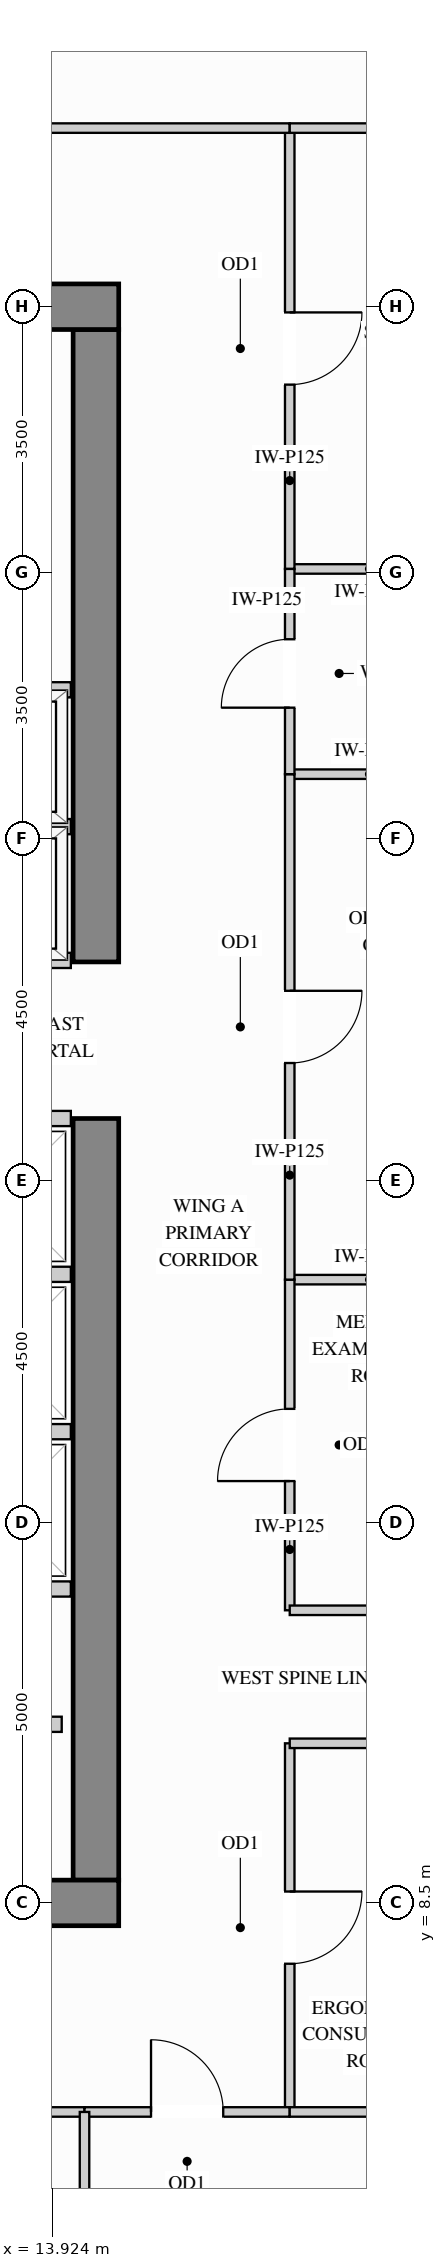
"""IFC4 building model, lengths in metres.
Left out: names, types, materials, properties, quantities, classifications, styles, units other than length and angle.
Written with IfcOpenShell. Run it as: python <this file> out.ifc"""

import sys

from ifc_helpers import new_model, si_unit, direction, frame, frame_2d, origin, place, context, subcontext, project, spatial, rectangle, extrude, source, transform, mapped, element, fill, save


model = new_model("IFC4")
c1 = context("Model", 3, precision=1e-05, world=origin(), true_north=direction((0.0, 1.0)))
c2 = subcontext(c1, "Body", "Model", "MODEL_VIEW")
j1 = project(units=[si_unit("LENGTHUNIT", "METRE"), si_unit("PLANEANGLEUNIT", "RADIAN")], contexts=[c1])
p1 = place(None, origin())
s1 = spatial("IfcSite", under=j1, at=p1, CompositionType="ELEMENT")
p2 = place(p1, origin())
s2 = spatial("IfcBuilding", under=s1, at=p2, CompositionType="ELEMENT")
p3 = place(p2, frame((0.0, 0.0, 182.7)))
s3 = spatial("IfcBuildingStorey", under=s2, at=p3, CompositionType="ELEMENT", Elevation=182.7)
m1 = source(origin(), c2, "Body", "SweptSolid", [
    extrude(rectangle(XDim=10.02, YDim=0.6, at=frame_2d((5.01, 0.0))), origin(), (0.0, 0.0, 1.0), 3.4),
])
p4 = place(p3, frame((14.5, 8.8, 0.0), z_axis=(0.0, 0.0, 1.0), x_axis=(0.0, 1.0, 0.0)))
e1 = element("IfcWall", 1, at=p4, inside=s3, PredefinedType="SHEAR", context=c2, shape_type="MappedRepresentation", body=[
    mapped(m1, transform((0.0, 0.0, 0.0), x_axis=(1.0, 0.0, 0.0), y_axis=(0.0, 1.0, 0.0), z_axis=(0.0, 0.0, 1.0))),
])
m2 = source(origin(), c2, "Body", "SweptSolid", [
    extrude(rectangle(XDim=8.32, YDim=0.6, at=frame_2d((4.16, 0.0))), origin(), (0.0, 0.0, 1.0), 3.4),
])
p5 = place(p3, frame((14.5, 20.88, 0.0), z_axis=(0.0, 0.0, 1.0), x_axis=(0.0, 1.0, 0.0)))
e2 = element("IfcWall", 2, at=p5, inside=s3, PredefinedType="SHEAR", context=c2, shape_type="MappedRepresentation", body=[
    mapped(m2, transform((0.0, 0.0, 0.0), x_axis=(1.0, 0.0, 0.0), y_axis=(0.0, 1.0, 0.0), z_axis=(0.0, 0.0, 1.0))),
])
m3 = source(origin(), c2, "Body", "SweptSolid", [
    extrude(rectangle(XDim=10.6, YDim=0.6, at=frame_2d((5.3, 0.0))), origin(), (0.0, 0.0, 1.0), 3.4),
])
for number, where, z_axis, x_axis in (
    (3, (4.2, 29.5, 0.0), (0.0, 0.0, 1.0), (1.0, 0.0, 0.0)),
    (4, (4.2, 8.5, 0.0), (0.0, 0.0, 1.0), (1.0, 0.0, 0.0)),
):
    element("IfcWall", number, at=place(p3, frame(where, z_axis=z_axis, x_axis=x_axis)), inside=s3, PredefinedType="SHEAR", context=c2, shape_type="MappedRepresentation", body=[
        mapped(m3, transform((0.0, 0.0, 0.0), x_axis=(1.0, 0.0, 0.0), y_axis=(0.0, 1.0, 0.0), z_axis=(0.0, 0.0, 1.0))),
    ])
m4 = source(origin(), c2, "Body", "SweptSolid", [
    extrude(rectangle(XDim=2.1, YDim=0.125, at=frame_2d((1.05, 0.0))), origin(), (0.0, 0.0, 1.0), 2.916),
])
p6 = place(p3, frame((17.05, 16.7, 0.0), z_axis=(0.0, 0.0, 1.0), x_axis=(1.0, 0.0, 0.0)))
e5 = element("IfcWall", 5, at=p6, inside=s3, PredefinedType="PARTITIONING", context=c2, shape_type="MappedRepresentation", body=[
    mapped(m4, transform((0.0, 0.0, 0.0), x_axis=(1.0, 0.0, 0.0), y_axis=(0.0, 1.0, 0.0), z_axis=(0.0, 0.0, 1.0))),
])
m5 = source(origin(), c2, "Body", "SweptSolid", [
    extrude(rectangle(XDim=2.098, YDim=0.125, at=frame_2d((1.049, 0.0))), origin(), (0.0, 0.0, 1.0), 3.385),
])
for number, where, z_axis, x_axis in (
    (6, (17.05, 23.35, 0.0), (0.0, 0.0, 1.0), (1.0, 0.0, 0.0)),
    (7, (17.05, 26.05, 0.0), (0.0, 0.0, 1.0), (1.0, 0.0, 0.0)),
):
    element("IfcWall", number, at=place(p3, frame(where, z_axis=z_axis, x_axis=x_axis)), inside=s3, PredefinedType="PARTITIONING", context=c2, shape_type="MappedRepresentation", body=[
        mapped(m5, transform((0.0, 0.0, 0.0), x_axis=(1.0, 0.0, 0.0), y_axis=(0.0, 1.0, 0.0), z_axis=(0.0, 0.0, 1.0))),
    ])
p7 = place(p3, frame((17.05, 12.35, 0.0), z_axis=(0.0, 0.0, 1.0), x_axis=(0.0, 1.0, 0.0)))
e8 = element("IfcWall", 8, at=p7, inside=s3, PredefinedType="PARTITIONING", context=c2, shape_type="SweptSolid", body=[
    extrude(rectangle(XDim=4.35, YDim=0.125, at=frame_2d((2.175, 0.0))), origin(), (0.0, 0.0, 1.0), 3.385),
])
p8 = place(p7, frame((1.7, 0.0, 0.0)))
e9 = element("IfcOpeningElement", 9, at=p8, cuts=e8, PredefinedType="OPENING", context=c2, shape_type="SweptSolid", body=[
    extrude(rectangle(XDim=0.95, YDim=2.15, at=frame_2d((0.475, 1.075))), frame((0.0, 0.073, 0.0), z_axis=(0.0, -1.0, 0.0), x_axis=(1.0, 0.0, 0.0)), (0.0, 0.0, 1.0), 0.145),
])
p9 = place(p3, frame((17.05, 16.7, 0.0), z_axis=(0.0, 0.0, 1.0), x_axis=(0.0, 1.0, 0.0)))
e10 = element("IfcWall", 10, at=p9, inside=s3, PredefinedType="PARTITIONING", context=c2, shape_type="SweptSolid", body=[
    extrude(rectangle(XDim=6.65, YDim=0.125, at=frame_2d((3.325, 0.0))), origin(), (0.0, 0.0, 1.0), 3.385),
])
p10 = place(p9, frame((2.85, 0.0, 0.0)))
e11 = element("IfcOpeningElement", 11, at=p10, cuts=e10, PredefinedType="OPENING", context=c2, shape_type="SweptSolid", body=[
    extrude(rectangle(XDim=0.95, YDim=2.15, at=frame_2d((0.475, 1.075))), frame((0.0, 0.073, 0.0), z_axis=(0.0, -1.0, 0.0), x_axis=(1.0, 0.0, 0.0)), (0.0, 0.0, 1.0), 0.145),
])
p11 = place(p3, frame((17.05, 26.05, 0.0), z_axis=(0.0, 0.0, 1.0), x_axis=(0.0, 1.0, 0.0)))
e12 = element("IfcWall", 12, at=p11, inside=s3, PredefinedType="PARTITIONING", context=c2, shape_type="SweptSolid", body=[
    extrude(rectangle(XDim=5.8, YDim=0.125, at=frame_2d((2.9, 0.0))), origin(), (0.0, 0.0, 1.0), 3.385),
])
p12 = place(p11, frame((2.425, 0.0, 0.0)))
e13 = element("IfcOpeningElement", 13, at=p12, cuts=e12, PredefinedType="OPENING", context=c2, shape_type="SweptSolid", body=[
    extrude(rectangle(XDim=0.95, YDim=2.15, at=frame_2d((0.475, 1.075))), frame((0.0, 0.073, 0.0), z_axis=(0.0, -1.0, 0.0), x_axis=(1.0, 0.0, 0.0)), (0.0, 0.0, 1.0), 0.145),
])
p13 = place(p3, frame((17.05, 5.75, 0.0), z_axis=(0.0, 0.0, 1.0), x_axis=(0.0, 1.0, 0.0)))
e14 = element("IfcWall", 14, at=p13, inside=s3, PredefinedType="PARTITIONING", context=c2, shape_type="SweptSolid", body=[
    extrude(rectangle(XDim=4.85, YDim=0.125, at=frame_2d((2.425, 0.0))), origin(), (0.0, 0.0, 1.0), 3.385),
])
p14 = place(p13, frame((1.95, 0.0, 0.0)))
e15 = element("IfcOpeningElement", 15, at=p14, cuts=e14, PredefinedType="OPENING", context=c2, shape_type="SweptSolid", body=[
    extrude(rectangle(XDim=0.95, YDim=2.15, at=frame_2d((0.475, 1.075))), frame((0.0, 0.073, 0.0), z_axis=(0.0, -1.0, 0.0), x_axis=(1.0, 0.0, 0.0)), (0.0, 0.0, 1.0), 0.145),
])
p15 = place(p3, frame((17.05, 23.35, 0.0), z_axis=(0.0, 0.0, 1.0), x_axis=(0.0, 1.0, 0.0)))
e16 = element("IfcWall", 16, at=p15, inside=s3, PredefinedType="PARTITIONING", context=c2, shape_type="SweptSolid", body=[
    extrude(rectangle(XDim=2.7, YDim=0.125, at=frame_2d((1.35, 0.0))), origin(), (0.0, 0.0, 1.0), 3.385),
])
p16 = place(p15, frame((0.875, 0.0, 0.0)))
e17 = element("IfcOpeningElement", 17, at=p16, cuts=e16, PredefinedType="OPENING", context=c2, shape_type="SweptSolid", body=[
    extrude(rectangle(XDim=0.9, YDim=2.15, at=frame_2d((0.45, 1.075))), frame((0.0, 0.073, 0.0), z_axis=(0.0, -1.0, 0.0), x_axis=(1.0, 0.0, 0.0)), (0.0, 0.0, 1.0), 0.145),
])
p17 = place(p3, frame((9.039, 31.85, 0.0), z_axis=(0.0, 0.0, 1.0), x_axis=(1.0, 0.0, 0.0)))
e18 = element("IfcWall", 18, at=p17, inside=s3, PredefinedType="PARTITIONING", context=c2, shape_type="SweptSolid", body=[
    extrude(rectangle(XDim=8.011, YDim=0.125, at=frame_2d((4.005, 0.0))), origin(), (0.0, 0.0, 1.0), 2.848),
])
p18 = place(p17, frame((3.531, 0.0, 0.0)))
e19 = element("IfcOpeningElement", 19, at=p18, cuts=e18, PredefinedType="OPENING", context=c2, shape_type="SweptSolid", body=[
    extrude(rectangle(XDim=0.95, YDim=2.15, at=frame_2d((0.475, 1.075))), frame((0.0, 0.073, 0.0), z_axis=(0.0, -1.0, 0.0), x_axis=(1.0, 0.0, 0.0)), (0.0, 0.0, 1.0), 0.145),
])
m6 = source(origin(), c2, "Body", "SweptSolid", [
    extrude(rectangle(XDim=2.098, YDim=0.125, at=frame_2d((1.049, 0.0))), origin(), (0.0, 0.0, 1.0), 2.848),
])
p19 = place(p3, frame((17.05, 31.85, 0.0), z_axis=(0.0, 0.0, 1.0), x_axis=(1.0, 0.0, 0.0)))
e20 = element("IfcWall", 20, at=p19, inside=s3, PredefinedType="PARTITIONING", context=c2, shape_type="MappedRepresentation", body=[
    mapped(m6, transform((0.0, 0.0, 0.0), x_axis=(1.0, 0.0, 0.0), y_axis=(0.0, 1.0, 0.0), z_axis=(0.0, 0.0, 1.0))),
])
m7 = source(origin(), c2, "Body", "SweptSolid", [
    extrude(rectangle(XDim=2.45, YDim=0.125, at=frame_2d((1.225, 0.0))), origin(), (0.0, 0.0, 1.0), 3.385),
])
for number, where, z_axis, x_axis in (
    (21, (17.05, 12.35, 0.0), (0.0, 0.0, 1.0), (1.0, 0.0, 0.0)),
    (22, (17.05, 10.6, 0.0), (0.0, 0.0, 1.0), (1.0, 0.0, 0.0)),
):
    element("IfcWall", number, at=place(p3, frame(where, z_axis=z_axis, x_axis=x_axis)), inside=s3, PredefinedType="PARTITIONING", context=c2, shape_type="MappedRepresentation", body=[
        mapped(m7, transform((0.0, 0.0, 0.0), x_axis=(1.0, 0.0, 0.0), y_axis=(0.0, 1.0, 0.0), z_axis=(0.0, 0.0, 1.0))),
    ])
p20 = place(p3, frame((8.558, 5.75, 0.0), z_axis=(0.0, 0.0, 1.0), x_axis=(1.0, 0.0, 0.0)))
e23 = element("IfcWall", 23, at=p20, inside=s3, PredefinedType="PARTITIONING", context=c2, shape_type="SweptSolid", body=[
    extrude(rectangle(XDim=5.792, YDim=0.125, at=frame_2d((2.896, 0.0))), origin(), (0.0, 0.0, 1.0), 3.385),
])
p21 = place(p20, frame((2.421, 0.0, 0.0)))
e24 = element("IfcOpeningElement", 24, at=p21, cuts=e23, PredefinedType="OPENING", context=c2, shape_type="SweptSolid", body=[
    extrude(rectangle(XDim=0.95, YDim=2.15, at=frame_2d((0.475, 1.075))), frame((0.0, 0.073, 0.0), z_axis=(0.0, -1.0, 0.0), x_axis=(1.0, 0.0, 0.0)), (0.0, 0.0, 1.0), 0.145),
])
p22 = place(p3, frame((14.35, 5.75, 0.0), z_axis=(0.0, 0.0, 1.0), x_axis=(1.0, 0.0, 0.0)))
e25 = element("IfcWall", 25, at=p22, inside=s3, PredefinedType="PARTITIONING", context=c2, shape_type="SweptSolid", body=[
    extrude(rectangle(XDim=2.7, YDim=0.125, at=frame_2d((1.35, 0.0))), origin(), (0.0, 0.0, 1.0), 3.385),
])
p23 = place(p22, frame((0.875, 0.0, 0.0)))
e26 = element("IfcOpeningElement", 26, at=p23, cuts=e25, PredefinedType="OPENING", context=c2, shape_type="SweptSolid", body=[
    extrude(rectangle(XDim=0.95, YDim=2.15, at=frame_2d((0.475, 1.075))), frame((0.0, 0.073, 0.0), z_axis=(0.0, -1.0, 0.0), x_axis=(1.0, 0.0, 0.0)), (0.0, 0.0, 1.0), 0.145),
])
p24 = place(p3, frame((17.05, 5.75, 0.0), z_axis=(0.0, 0.0, 1.0), x_axis=(1.0, 0.0, 0.0)))
e27 = element("IfcWall", 27, at=p24, inside=s3, PredefinedType="PARTITIONING", context=c2, shape_type="MappedRepresentation", body=[
    mapped(m5, transform((0.0, 0.0, 0.0), x_axis=(1.0, 0.0, 0.0), y_axis=(0.0, 1.0, 0.0), z_axis=(0.0, 0.0, 1.0))),
])
m8 = source(origin(), c2, "Body", "SweptSolid", [
    extrude(rectangle(XDim=4.63, YDim=0.125, at=frame_2d((2.315, 0.0))), origin(), (0.0, 0.0, 1.0), 3.385),
])
p25 = place(p3, frame((14.35, 1.12, 0.0), z_axis=(0.0, 0.0, 1.0), x_axis=(0.0, 1.0, 0.0)))
e28 = element("IfcWall", 28, at=p25, inside=s3, PredefinedType="PARTITIONING", context=c2, shape_type="MappedRepresentation", body=[
    mapped(m8, transform((0.0, 0.0, 0.0), x_axis=(1.0, 0.0, 0.0), y_axis=(0.0, 1.0, 0.0), z_axis=(0.0, 0.0, 1.0))),
])
m9 = source(origin(), c2, "Body", "SweptSolid", [
    extrude(rectangle(XDim=1.63, YDim=0.2, at=frame_2d((0.815, 0.0))), origin(), (0.0, 0.0, 1.0), 3.385),
])
p26 = place(p3, frame((12.42, 10.85, 0.0), z_axis=(0.0, 0.0, 1.0), x_axis=(1.0, 0.0, 0.0)))
e29 = element("IfcWall", 29, at=p26, inside=s3, PredefinedType="PARTITIONING", context=c2, shape_type="MappedRepresentation", body=[
    mapped(m9, transform((0.0, 0.0, 0.0), x_axis=(1.0, 0.0, 0.0), y_axis=(0.0, 1.0, 0.0), z_axis=(0.0, 0.0, 1.0))),
])
m10 = source(origin(), c2, "Body", "SweptSolid", [
    extrude(rectangle(XDim=2.34, YDim=0.2, at=frame_2d((1.17, 0.0))), origin(), (0.0, 0.0, 1.0), 3.385),
])
for number, where, z_axis, x_axis in (
    (30, (11.83, 22.66, 0.0), (0.0, 0.0, 1.0), (1.0, 0.0, 0.0)),
    (31, (11.83, 20.9, 0.0), (0.0, 0.0, 1.0), (1.0, 0.0, 0.0)),
    (32, (11.83, 24.46, 0.0), (0.0, 0.0, 1.0), (1.0, 0.0, 0.0)),
):
    element("IfcWall", number, at=place(p3, frame(where, z_axis=z_axis, x_axis=x_axis)), inside=s3, PredefinedType="PARTITIONING", context=c2, shape_type="MappedRepresentation", body=[
        mapped(m10, transform((0.0, 0.0, 0.0), x_axis=(1.0, 0.0, 0.0), y_axis=(0.0, 1.0, 0.0), z_axis=(0.0, 0.0, 1.0))),
    ])
m11 = source(origin(), c2, "Body", "SweptSolid", [
    extrude(rectangle(XDim=1.94, YDim=0.2, at=frame_2d((0.97, 0.0))), origin(), (0.0, 0.0, 1.0), 3.385),
])
for number, where, z_axis, x_axis in (
    (33, (12.23, 14.7, 0.0), (0.0, 0.0, 1.0), (1.0, 0.0, 0.0)),
    (34, (12.23, 12.63, 0.0), (0.0, 0.0, 1.0), (1.0, 0.0, 0.0)),
    (35, (12.23, 16.77, 0.0), (0.0, 0.0, 1.0), (1.0, 0.0, 0.0)),
    (36, (12.23, 18.82, 0.0), (0.0, 0.0, 1.0), (1.0, 0.0, 0.0)),
):
    element("IfcWall", number, at=place(p3, frame(where, z_axis=z_axis, x_axis=x_axis)), inside=s3, PredefinedType="PARTITIONING", context=c2, shape_type="MappedRepresentation", body=[
        mapped(m11, transform((0.0, 0.0, 0.0), x_axis=(1.0, 0.0, 0.0), y_axis=(0.0, 1.0, 0.0), z_axis=(0.0, 0.0, 1.0))),
    ])
m12 = source(origin(), c2, "Body", "SweptSolid", [
    extrude(rectangle(XDim=0.95, YDim=2.15, at=frame_2d((0.475, 1.075))), frame((0.0, 0.025, 0.0), z_axis=(0.0, -1.0, 0.0), x_axis=(1.0, 0.0, 0.0)), (0.0, 0.0, 1.0), 0.05),
])
p27 = place(p14, origin())
e37 = element("IfcDoor", 37, at=p27, inside=s3, OperationType="SINGLE_SWING_RIGHT", PredefinedType="DOOR", context=c2, shape_type="MappedRepresentation", body=[
    mapped(m12, transform((0.0, 0.0, 0.0), x_axis=(1.0, 0.0, 0.0), y_axis=(0.0, 1.0, 0.0), z_axis=(0.0, 0.0, 1.0))),
])
fill(e15, e37)
p28 = place(p8, origin())
e38 = element("IfcDoor", 38, at=p28, inside=s3, OperationType="SINGLE_SWING_LEFT", PredefinedType="DOOR", context=c2, shape_type="MappedRepresentation", body=[
    mapped(m12, transform((0.0, 0.0, 0.0), x_axis=(1.0, 0.0, 0.0), y_axis=(0.0, 1.0, 0.0), z_axis=(0.0, 0.0, 1.0))),
])
fill(e9, e38)
p29 = place(p10, origin())
e39 = element("IfcDoor", 39, at=p29, inside=s3, OperationType="SINGLE_SWING_RIGHT", PredefinedType="DOOR", context=c2, shape_type="MappedRepresentation", body=[
    mapped(m12, transform((0.0, 0.0, 0.0), x_axis=(1.0, 0.0, 0.0), y_axis=(0.0, 1.0, 0.0), z_axis=(0.0, 0.0, 1.0))),
])
fill(e11, e39)
p30 = place(p12, origin())
e40 = element("IfcDoor", 40, at=p30, inside=s3, OperationType="SINGLE_SWING_RIGHT", PredefinedType="DOOR", context=c2, shape_type="MappedRepresentation", body=[
    mapped(m12, transform((0.0, 0.0, 0.0), x_axis=(1.0, 0.0, 0.0), y_axis=(0.0, 1.0, 0.0), z_axis=(0.0, 0.0, 1.0))),
])
fill(e13, e40)
p31 = place(p23, origin())
e41 = element("IfcDoor", 41, at=p31, inside=s3, OperationType="SINGLE_SWING_LEFT", PredefinedType="DOOR", context=c2, shape_type="MappedRepresentation", body=[
    mapped(m12, transform((0.0, 0.0, 0.0), x_axis=(1.0, 0.0, 0.0), y_axis=(0.0, 1.0, 0.0), z_axis=(0.0, 0.0, 1.0))),
])
fill(e26, e41)
m13 = source(origin(), c2, "Body", "SweptSolid", [
    extrude(rectangle(XDim=0.9, YDim=2.15, at=frame_2d((0.45, 1.075))), frame((0.0, 0.025, 0.0), z_axis=(0.0, -1.0, 0.0), x_axis=(1.0, 0.0, 0.0)), (0.0, 0.0, 1.0), 0.05),
])
p32 = place(p16, origin())
e42 = element("IfcDoor", 42, at=p32, inside=s3, OperationType="SINGLE_SWING_LEFT", PredefinedType="DOOR", context=c2, shape_type="MappedRepresentation", body=[
    mapped(m13, transform((0.0, 0.0, 0.0), x_axis=(1.0, 0.0, 0.0), y_axis=(0.0, 1.0, 0.0), z_axis=(0.0, 0.0, 1.0))),
])
fill(e17, e42)
save(model, sys.argv[1])
